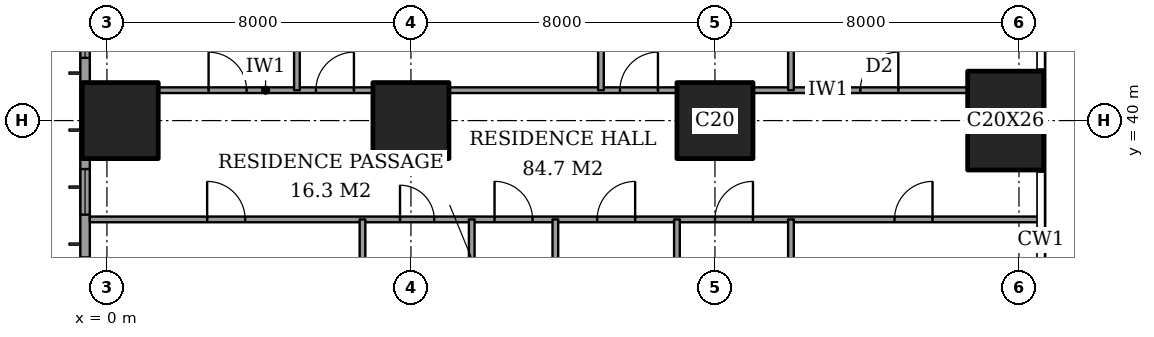
"""IFC4 building model, lengths in metres.
Left out: names, types, materials, properties, quantities, classifications, styles, units other than length and angle.
Written with IfcOpenShell. Run it as: python <this file> out.ifc"""

import sys

from ifc_helpers import new_model, si_unit, direction, frame, frame_2d, origin, origin_2d, place, context, subcontext, project, spatial, rectangle, extrude, element, fill, save


model = new_model("IFC4")
c1 = context("Model", 3, precision=1e-05, world=origin(), true_north=direction((0.0, 1.0)))
c2 = subcontext(c1, "Body", "Model", "MODEL_VIEW")
j1 = project(units=[si_unit("LENGTHUNIT", "METRE"), si_unit("PLANEANGLEUNIT", "RADIAN")], contexts=[c1])
p1 = place(None, origin())
s1 = spatial("IfcSite", under=j1, at=p1, CompositionType="ELEMENT")
p2 = place(p1, origin())
s2 = spatial("IfcBuilding", under=s1, at=p2, CompositionType="ELEMENT")
p3 = place(p2, frame((0.0, 0.0, 36.8)))
s3 = spatial("IfcBuildingStorey", under=s2, at=p3, CompositionType="ELEMENT", Elevation=36.8)
for number, where, z_axis, x_axis in (
    (1, (0.35, 40.0, 0.0), (0.0, 0.0, 1.0), (1.0, 0.0, 0.0)),
    (2, (8.0, 40.0, 0.0), (0.0, 0.0, 1.0), (1.0, 0.0, 0.0)),
    (3, (16.0, 40.0, 0.0), (0.0, 0.0, 1.0), (1.0, 0.0, 0.0)),
):
    element("IfcColumn", number, at=place(p3, frame(where, z_axis=z_axis, x_axis=x_axis)), inside=s3, PredefinedType="COLUMN", context=c2, shape_type="SweptSolid", body=[
        extrude(rectangle(XDim=2.0, YDim=2.0, at=origin_2d()), origin(), (0.0, 0.0, 1.0), 3.6),
    ])
p4 = place(p3, frame((23.65, 40.0, 0.0), z_axis=(0.0, 0.0, 1.0), x_axis=(1.0, 0.0, 0.0)))
e4 = element("IfcColumn", 4, at=p4, inside=s3, PredefinedType="COLUMN", context=c2, shape_type="SweptSolid", body=[
    extrude(rectangle(XDim=2.0, YDim=2.6, at=origin_2d()), origin(), (0.0, 0.0, 1.0), 3.6),
])
p5 = place(p3, frame((-0.575, 44.825, 0.0), z_axis=(0.0, 0.0, 1.0), x_axis=(0.0, -1.0, 0.0)))
e5 = element("IfcWall", 5, at=p5, inside=s3, PredefinedType="SOLIDWALL", context=c2, shape_type="SweptSolid", body=[
    extrude(rectangle(XDim=41.65, YDim=0.25, at=frame_2d((20.825, 0.0))), origin(), (0.0, 0.0, 1.0), 3.6),
])
p6 = place(p5, frame((0.775, 0.0, 0.6)))
e6 = element("IfcOpeningElement", 6, at=p6, cuts=e5, PredefinedType="OPENING", context=c2, shape_type="SweptSolid", body=[
    extrude(rectangle(XDim=2.4, YDim=2.0, at=frame_2d((1.2, 1.0))), frame((0.0, 0.135, 0.0), z_axis=(0.0, -1.0, 0.0), x_axis=(1.0, 0.0, 0.0)), (0.0, 0.0, 1.0), 0.27),
])
p7 = place(p5, frame((6.1, 0.0, 0.6)))
e7 = element("IfcOpeningElement", 7, at=p7, cuts=e5, PredefinedType="OPENING", context=c2, shape_type="SweptSolid", body=[
    extrude(rectangle(XDim=1.2, YDim=2.0, at=frame_2d((0.6, 1.0))), frame((0.0, 0.135, 0.0), z_axis=(0.0, -1.0, 0.0), x_axis=(1.0, 0.0, 0.0)), (0.0, 0.0, 1.0), 0.27),
])
p8 = place(p5, frame((8.425, 0.0, 0.6)))
e8 = element("IfcOpeningElement", 8, at=p8, cuts=e5, PredefinedType="OPENING", context=c2, shape_type="SweptSolid", body=[
    extrude(rectangle(XDim=2.4, YDim=2.0, at=frame_2d((1.2, 1.0))), frame((0.0, 0.135, 0.0), z_axis=(0.0, -1.0, 0.0), x_axis=(1.0, 0.0, 0.0)), (0.0, 0.0, 1.0), 0.27),
])
p9 = place(p5, frame((15.625, 0.0, 0.6)))
e9 = element("IfcOpeningElement", 9, at=p9, cuts=e5, PredefinedType="OPENING", context=c2, shape_type="SweptSolid", body=[
    extrude(rectangle(XDim=2.4, YDim=2.0, at=frame_2d((1.2, 1.0))), frame((0.0, 0.135, 0.0), z_axis=(0.0, -1.0, 0.0), x_axis=(1.0, 0.0, 0.0)), (0.0, 0.0, 1.0), 0.27),
])
p10 = place(p5, frame((23.625, 0.0, 0.6)))
e10 = element("IfcOpeningElement", 10, at=p10, cuts=e5, PredefinedType="OPENING", context=c2, shape_type="SweptSolid", body=[
    extrude(rectangle(XDim=2.4, YDim=2.0, at=frame_2d((1.2, 1.0))), frame((0.0, 0.135, 0.0), z_axis=(0.0, -1.0, 0.0), x_axis=(1.0, 0.0, 0.0)), (0.0, 0.0, 1.0), 0.27),
])
p11 = place(p5, frame((30.825, 0.0, 0.6)))
e11 = element("IfcOpeningElement", 11, at=p11, cuts=e5, PredefinedType="OPENING", context=c2, shape_type="SweptSolid", body=[
    extrude(rectangle(XDim=2.4, YDim=2.0, at=frame_2d((1.2, 1.0))), frame((0.0, 0.135, 0.0), z_axis=(0.0, -1.0, 0.0), x_axis=(1.0, 0.0, 0.0)), (0.0, 0.0, 1.0), 0.27),
])
p12 = place(p5, frame((34.5, 0.0, 0.6)))
e12 = element("IfcOpeningElement", 12, at=p12, cuts=e5, PredefinedType="OPENING", context=c2, shape_type="SweptSolid", body=[
    extrude(rectangle(XDim=1.2, YDim=2.0, at=frame_2d((0.6, 1.0))), frame((0.0, 0.135, 0.0), z_axis=(0.0, -1.0, 0.0), x_axis=(1.0, 0.0, 0.0)), (0.0, 0.0, 1.0), 0.27),
])
p13 = place(p5, frame((38.475, 0.0, 0.6)))
e13 = element("IfcOpeningElement", 13, at=p13, cuts=e5, PredefinedType="OPENING", context=c2, shape_type="SweptSolid", body=[
    extrude(rectangle(XDim=2.4, YDim=2.0, at=frame_2d((1.2, 1.0))), frame((0.0, 0.135, 0.0), z_axis=(0.0, -1.0, 0.0), x_axis=(1.0, 0.0, 0.0)), (0.0, 0.0, 1.0), 0.27),
])
p14 = place(p3, frame((-0.45, 37.4, 0.0), z_axis=(0.0, 0.0, 1.0), x_axis=(1.0, 0.0, 0.0)))
e14 = element("IfcWall", 14, at=p14, inside=s3, PredefinedType="PARTITIONING", context=c2, shape_type="SweptSolid", body=[
    extrude(rectangle(XDim=25.011, YDim=0.15, at=frame_2d((12.505, 0.0))), origin(), (0.0, 0.0, 1.0), 3.35),
])
p15 = place(p14, frame((10.65, 0.0, 0.0)))
e15 = element("IfcOpeningElement", 15, at=p15, cuts=e14, PredefinedType="OPENING", context=c2, shape_type="SweptSolid", body=[
    extrude(rectangle(XDim=1.0, YDim=2.1, at=frame_2d((0.5, 1.05))), frame((0.0, 0.085, 0.0), z_axis=(0.0, -1.0, 0.0), x_axis=(1.0, 0.0, 0.0)), (0.0, 0.0, 1.0), 0.17),
])
p16 = place(p14, frame((3.087, 0.0, 0.0)))
e16 = element("IfcOpeningElement", 16, at=p16, cuts=e14, PredefinedType="OPENING", context=c2, shape_type="SweptSolid", body=[
    extrude(rectangle(XDim=1.0, YDim=2.1, at=frame_2d((0.5, 1.05))), frame((0.0, 0.085, 0.0), z_axis=(0.0, -1.0, 0.0), x_axis=(1.0, 0.0, 0.0)), (0.0, 0.0, 1.0), 0.17),
])
p17 = place(p14, frame((8.163, 0.0, 0.0)))
e17 = element("IfcOpeningElement", 17, at=p17, cuts=e14, PredefinedType="OPENING", context=c2, shape_type="SweptSolid", body=[
    extrude(rectangle(XDim=0.9, YDim=2.1, at=frame_2d((0.45, 1.05))), frame((0.0, 0.085, 0.0), z_axis=(0.0, -1.0, 0.0), x_axis=(1.0, 0.0, 0.0)), (0.0, 0.0, 1.0), 0.17),
])
p18 = place(p14, frame((13.35, 0.0, 0.0)))
e18 = element("IfcOpeningElement", 18, at=p18, cuts=e14, PredefinedType="OPENING", context=c2, shape_type="SweptSolid", body=[
    extrude(rectangle(XDim=1.0, YDim=2.1, at=frame_2d((0.5, 1.05))), frame((0.0, 0.085, 0.0), z_axis=(0.0, -1.0, 0.0), x_axis=(1.0, 0.0, 0.0)), (0.0, 0.0, 1.0), 0.17),
])
p19 = place(p14, frame((16.45, 0.0, 0.0)))
e19 = element("IfcOpeningElement", 19, at=p19, cuts=e14, PredefinedType="OPENING", context=c2, shape_type="SweptSolid", body=[
    extrude(rectangle(XDim=1.0, YDim=2.1, at=frame_2d((0.5, 1.05))), frame((0.0, 0.085, 0.0), z_axis=(0.0, -1.0, 0.0), x_axis=(1.0, 0.0, 0.0)), (0.0, 0.0, 1.0), 0.17),
])
p20 = place(p14, frame((21.175, 0.0, 0.0)))
e20 = element("IfcOpeningElement", 20, at=p20, cuts=e14, PredefinedType="OPENING", context=c2, shape_type="SweptSolid", body=[
    extrude(rectangle(XDim=1.0, YDim=2.1, at=frame_2d((0.5, 1.05))), frame((0.0, 0.085, 0.0), z_axis=(0.0, -1.0, 0.0), x_axis=(1.0, 0.0, 0.0)), (0.0, 0.0, 1.0), 0.17),
])
p21 = place(p3, frame((1.35, 40.8, 0.0), z_axis=(0.0, 0.0, 1.0), x_axis=(1.0, 0.0, 0.0)))
e21 = element("IfcWall", 21, at=p21, inside=s3, PredefinedType="PARTITIONING", context=c2, shape_type="SweptSolid", body=[
    extrude(rectangle(XDim=5.65, YDim=0.15, at=frame_2d((2.825, 0.0))), origin(), (0.0, 0.0, 1.0), 3.35),
])
p22 = place(p21, frame((1.325, 0.0, 0.0)))
e22 = element("IfcOpeningElement", 22, at=p22, cuts=e21, PredefinedType="OPENING", context=c2, shape_type="SweptSolid", body=[
    extrude(rectangle(XDim=1.0, YDim=2.1, at=frame_2d((0.5, 1.05))), frame((0.0, 0.085, 0.0), z_axis=(0.0, -1.0, 0.0), x_axis=(1.0, 0.0, 0.0)), (0.0, 0.0, 1.0), 0.17),
])
p23 = place(p21, frame((4.15, 0.0, 0.0)))
e23 = element("IfcOpeningElement", 23, at=p23, cuts=e21, PredefinedType="OPENING", context=c2, shape_type="SweptSolid", body=[
    extrude(rectangle(XDim=1.0, YDim=2.1, at=frame_2d((0.5, 1.05))), frame((0.0, 0.085, 0.0), z_axis=(0.0, -1.0, 0.0), x_axis=(1.0, 0.0, 0.0)), (0.0, 0.0, 1.0), 0.17),
])
p24 = place(p3, frame((9.0, 40.8, 0.0), z_axis=(0.0, 0.0, 1.0), x_axis=(1.0, 0.0, 0.0)))
e24 = element("IfcWall", 24, at=p24, inside=s3, PredefinedType="PARTITIONING", context=c2, shape_type="SweptSolid", body=[
    extrude(rectangle(XDim=6.0, YDim=0.15, at=frame_2d((3.0, 0.0))), origin(), (0.0, 0.0, 1.0), 3.35),
])
p25 = place(p24, frame((4.5, 0.0, 0.0)))
e25 = element("IfcOpeningElement", 25, at=p25, cuts=e24, PredefinedType="OPENING", context=c2, shape_type="SweptSolid", body=[
    extrude(rectangle(XDim=1.0, YDim=2.1, at=frame_2d((0.5, 1.05))), frame((0.0, 0.085, 0.0), z_axis=(0.0, -1.0, 0.0), x_axis=(1.0, 0.0, 0.0)), (0.0, 0.0, 1.0), 0.17),
])
p26 = place(p3, frame((17.0, 40.8, 0.0), z_axis=(0.0, 0.0, 1.0), x_axis=(1.0, 0.0, 0.0)))
e26 = element("IfcWall", 26, at=p26, inside=s3, PredefinedType="PARTITIONING", context=c2, shape_type="SweptSolid", body=[
    extrude(rectangle(XDim=5.65, YDim=0.15, at=frame_2d((2.825, 0.0))), origin(), (0.0, 0.0, 1.0), 3.35),
])
p27 = place(p26, frame((2.825, 0.0, 0.0)))
e27 = element("IfcOpeningElement", 27, at=p27, cuts=e26, PredefinedType="OPENING", context=c2, shape_type="SweptSolid", body=[
    extrude(rectangle(XDim=1.0, YDim=2.1, at=frame_2d((0.5, 1.05))), frame((0.0, 0.085, 0.0), z_axis=(0.0, -1.0, 0.0), x_axis=(1.0, 0.0, 0.0)), (0.0, 0.0, 1.0), 0.17),
])
p28 = place(p3, frame((5.0, 40.8, 0.0), z_axis=(0.0, 0.0, 1.0), x_axis=(0.0, 1.0, 0.0)))
e28 = element("IfcWall", 28, at=p28, inside=s3, PredefinedType="PARTITIONING", context=c2, shape_type="SweptSolid", body=[
    extrude(rectangle(XDim=7.65, YDim=0.15, at=frame_2d((3.825, 0.0))), origin(), (0.0, 0.0, 1.0), 3.35),
])
p29 = place(p3, frame((6.725, 33.2, 0.0), z_axis=(0.0, 0.0, 1.0), x_axis=(0.0, 1.0, 0.0)))
e29 = element("IfcWall", 29, at=p29, inside=s3, PredefinedType="PARTITIONING", context=c2, shape_type="SweptSolid", body=[
    extrude(rectangle(XDim=4.2, YDim=0.15, at=frame_2d((2.1, 0.0))), origin(), (0.0, 0.0, 1.0), 3.35),
])
p30 = place(p3, frame((9.6, 28.0, 0.0), z_axis=(0.0, 0.0, 1.0), x_axis=(0.0, 1.0, 0.0)))
e30 = element("IfcWall", 30, at=p30, inside=s3, PredefinedType="PARTITIONING", context=c2, shape_type="SweptSolid", body=[
    extrude(rectangle(XDim=9.4, YDim=0.15, at=frame_2d((4.7, 0.0))), origin(), (0.0, 0.0, 1.0), 3.35),
])
p31 = place(p30, frame((0.5, 0.0, 0.0)))
e31 = element("IfcOpeningElement", 31, at=p31, cuts=e30, PredefinedType="OPENING", context=c2, shape_type="SweptSolid", body=[
    extrude(rectangle(XDim=1.0, YDim=2.1, at=frame_2d((0.5, 1.05))), frame((0.0, 0.085, 0.0), z_axis=(0.0, -1.0, 0.0), x_axis=(1.0, 0.0, 0.0)), (0.0, 0.0, 1.0), 0.17),
])
p32 = place(p3, frame((11.8, 30.0, 0.0), z_axis=(0.0, 0.0, 1.0), x_axis=(0.0, 1.0, 0.0)))
e32 = element("IfcWall", 32, at=p32, inside=s3, PredefinedType="PARTITIONING", context=c2, shape_type="SweptSolid", body=[
    extrude(rectangle(XDim=7.4, YDim=0.15, at=frame_2d((3.7, 0.0))), origin(), (0.0, 0.0, 1.0), 3.35),
])
p33 = place(p3, frame((13.0, 40.8, 0.0), z_axis=(0.0, 0.0, 1.0), x_axis=(0.0, 1.0, 0.0)))
e33 = element("IfcWall", 33, at=p33, inside=s3, PredefinedType="PARTITIONING", context=c2, shape_type="SweptSolid", body=[
    extrude(rectangle(XDim=7.65, YDim=0.15, at=frame_2d((3.825, 0.0))), origin(), (0.0, 0.0, 1.0), 3.35),
])
p34 = place(p3, frame((15.0, 33.2, 0.0), z_axis=(0.0, 0.0, 1.0), x_axis=(0.0, 1.0, 0.0)))
e34 = element("IfcWall", 34, at=p34, inside=s3, PredefinedType="PARTITIONING", context=c2, shape_type="SweptSolid", body=[
    extrude(rectangle(XDim=4.2, YDim=0.15, at=frame_2d((2.1, 0.0))), origin(), (0.0, 0.0, 1.0), 3.35),
])
p35 = place(p3, frame((18.0, 31.1, 0.0), z_axis=(0.0, 0.0, 1.0), x_axis=(0.0, 1.0, 0.0)))
e35 = element("IfcWall", 35, at=p35, inside=s3, PredefinedType="PARTITIONING", context=c2, shape_type="SweptSolid", body=[
    extrude(rectangle(XDim=6.3, YDim=0.15, at=frame_2d((3.15, 0.0))), origin(), (0.0, 0.0, 1.0), 3.35),
])
p36 = place(p3, frame((18.0, 40.8, 0.0), z_axis=(0.0, 0.0, 1.0), x_axis=(0.0, 1.0, 0.0)))
e36 = element("IfcWall", 36, at=p36, inside=s3, PredefinedType="PARTITIONING", context=c2, shape_type="SweptSolid", body=[
    extrude(rectangle(XDim=7.65, YDim=0.15, at=frame_2d((3.825, 0.0))), origin(), (0.0, 0.0, 1.0), 3.35),
])
p37 = place(p6, origin())
e37 = element("IfcWindow", 37, at=p37, inside=s3, PartitioningType="SINGLE_PANEL", PredefinedType="WINDOW", context=c2, shape_type="SweptSolid", body=[
    extrude(rectangle(XDim=2.4, YDim=2.0, at=frame_2d((1.2, 1.0))), frame((0.0, 0.03, 0.0), z_axis=(0.0, -1.0, 0.0), x_axis=(1.0, 0.0, 0.0)), (0.0, 0.0, 1.0), 0.06),
])
fill(e6, e37)
p38 = place(p7, origin())
e38 = element("IfcWindow", 38, at=p38, inside=s3, PartitioningType="SINGLE_PANEL", PredefinedType="WINDOW", context=c2, shape_type="SweptSolid", body=[
    extrude(rectangle(XDim=1.2, YDim=2.0, at=frame_2d((0.6, 1.0))), frame((0.0, 0.03, 0.0), z_axis=(0.0, -1.0, 0.0), x_axis=(1.0, 0.0, 0.0)), (0.0, 0.0, 1.0), 0.06),
])
fill(e7, e38)
p39 = place(p22, origin())
e39 = element("IfcDoor", 39, at=p39, inside=s3, OperationType="SINGLE_SWING_RIGHT", PredefinedType="DOOR", context=c2, shape_type="SweptSolid", body=[
    extrude(rectangle(XDim=1.0, YDim=2.1, at=frame_2d((0.5, 1.05))), frame((0.0, 0.025, 0.0), z_axis=(0.0, -1.0, 0.0), x_axis=(1.0, 0.0, 0.0)), (0.0, 0.0, 1.0), 0.05),
])
fill(e22, e39)
p40 = place(p23, origin())
e40 = element("IfcDoor", 40, at=p40, inside=s3, OperationType="SINGLE_SWING_LEFT", PredefinedType="DOOR", context=c2, shape_type="SweptSolid", body=[
    extrude(rectangle(XDim=1.0, YDim=2.1, at=frame_2d((0.5, 1.05))), frame((0.0, 0.025, 0.0), z_axis=(0.0, -1.0, 0.0), x_axis=(1.0, 0.0, 0.0)), (0.0, 0.0, 1.0), 0.05),
])
fill(e23, e40)
p41 = place(p25, origin())
e41 = element("IfcDoor", 41, at=p41, inside=s3, OperationType="SINGLE_SWING_LEFT", PredefinedType="DOOR", context=c2, shape_type="SweptSolid", body=[
    extrude(rectangle(XDim=1.0, YDim=2.1, at=frame_2d((0.5, 1.05))), frame((0.0, 0.025, 0.0), z_axis=(0.0, -1.0, 0.0), x_axis=(1.0, 0.0, 0.0)), (0.0, 0.0, 1.0), 0.05),
])
fill(e25, e41)
p42 = place(p27, origin())
e42 = element("IfcDoor", 42, at=p42, inside=s3, OperationType="SINGLE_SWING_LEFT", PredefinedType="DOOR", context=c2, shape_type="SweptSolid", body=[
    extrude(rectangle(XDim=1.0, YDim=2.1, at=frame_2d((0.5, 1.05))), frame((0.0, 0.025, 0.0), z_axis=(0.0, -1.0, 0.0), x_axis=(1.0, 0.0, 0.0)), (0.0, 0.0, 1.0), 0.05),
])
fill(e27, e42)
p43 = place(p15, origin())
e43 = element("IfcDoor", 43, at=p43, inside=s3, OperationType="SINGLE_SWING_RIGHT", PredefinedType="DOOR", context=c2, shape_type="SweptSolid", body=[
    extrude(rectangle(XDim=1.0, YDim=2.1, at=frame_2d((0.5, 1.05))), frame((0.0, 0.025, 0.0), z_axis=(0.0, -1.0, 0.0), x_axis=(1.0, 0.0, 0.0)), (0.0, 0.0, 1.0), 0.05),
])
fill(e15, e43)
p44 = place(p16, origin())
e44 = element("IfcDoor", 44, at=p44, inside=s3, OperationType="SINGLE_SWING_RIGHT", PredefinedType="DOOR", context=c2, shape_type="SweptSolid", body=[
    extrude(rectangle(XDim=1.0, YDim=2.1, at=frame_2d((0.5, 1.05))), frame((0.0, 0.025, 0.0), z_axis=(0.0, -1.0, 0.0), x_axis=(1.0, 0.0, 0.0)), (0.0, 0.0, 1.0), 0.05),
])
fill(e16, e44)
p45 = place(p17, origin())
e45 = element("IfcDoor", 45, at=p45, inside=s3, OperationType="SINGLE_SWING_RIGHT", PredefinedType="DOOR", context=c2, shape_type="SweptSolid", body=[
    extrude(rectangle(XDim=0.9, YDim=2.1, at=frame_2d((0.45, 1.05))), frame((0.0, 0.025, 0.0), z_axis=(0.0, -1.0, 0.0), x_axis=(1.0, 0.0, 0.0)), (0.0, 0.0, 1.0), 0.05),
])
fill(e17, e45)
p46 = place(p18, origin())
e46 = element("IfcDoor", 46, at=p46, inside=s3, OperationType="SINGLE_SWING_LEFT", PredefinedType="DOOR", context=c2, shape_type="SweptSolid", body=[
    extrude(rectangle(XDim=1.0, YDim=2.1, at=frame_2d((0.5, 1.05))), frame((0.0, 0.025, 0.0), z_axis=(0.0, -1.0, 0.0), x_axis=(1.0, 0.0, 0.0)), (0.0, 0.0, 1.0), 0.05),
])
fill(e18, e46)
p47 = place(p19, origin())
e47 = element("IfcDoor", 47, at=p47, inside=s3, OperationType="SINGLE_SWING_LEFT", PredefinedType="DOOR", context=c2, shape_type="SweptSolid", body=[
    extrude(rectangle(XDim=1.0, YDim=2.1, at=frame_2d((0.5, 1.05))), frame((0.0, 0.025, 0.0), z_axis=(0.0, -1.0, 0.0), x_axis=(1.0, 0.0, 0.0)), (0.0, 0.0, 1.0), 0.05),
])
fill(e19, e47)
p48 = place(p20, origin())
e48 = element("IfcDoor", 48, at=p48, inside=s3, OperationType="SINGLE_SWING_LEFT", PredefinedType="DOOR", context=c2, shape_type="SweptSolid", body=[
    extrude(rectangle(XDim=1.0, YDim=2.1, at=frame_2d((0.5, 1.05))), frame((0.0, 0.025, 0.0), z_axis=(0.0, -1.0, 0.0), x_axis=(1.0, 0.0, 0.0)), (0.0, 0.0, 1.0), 0.05),
])
fill(e20, e48)
save(model, sys.argv[1])
